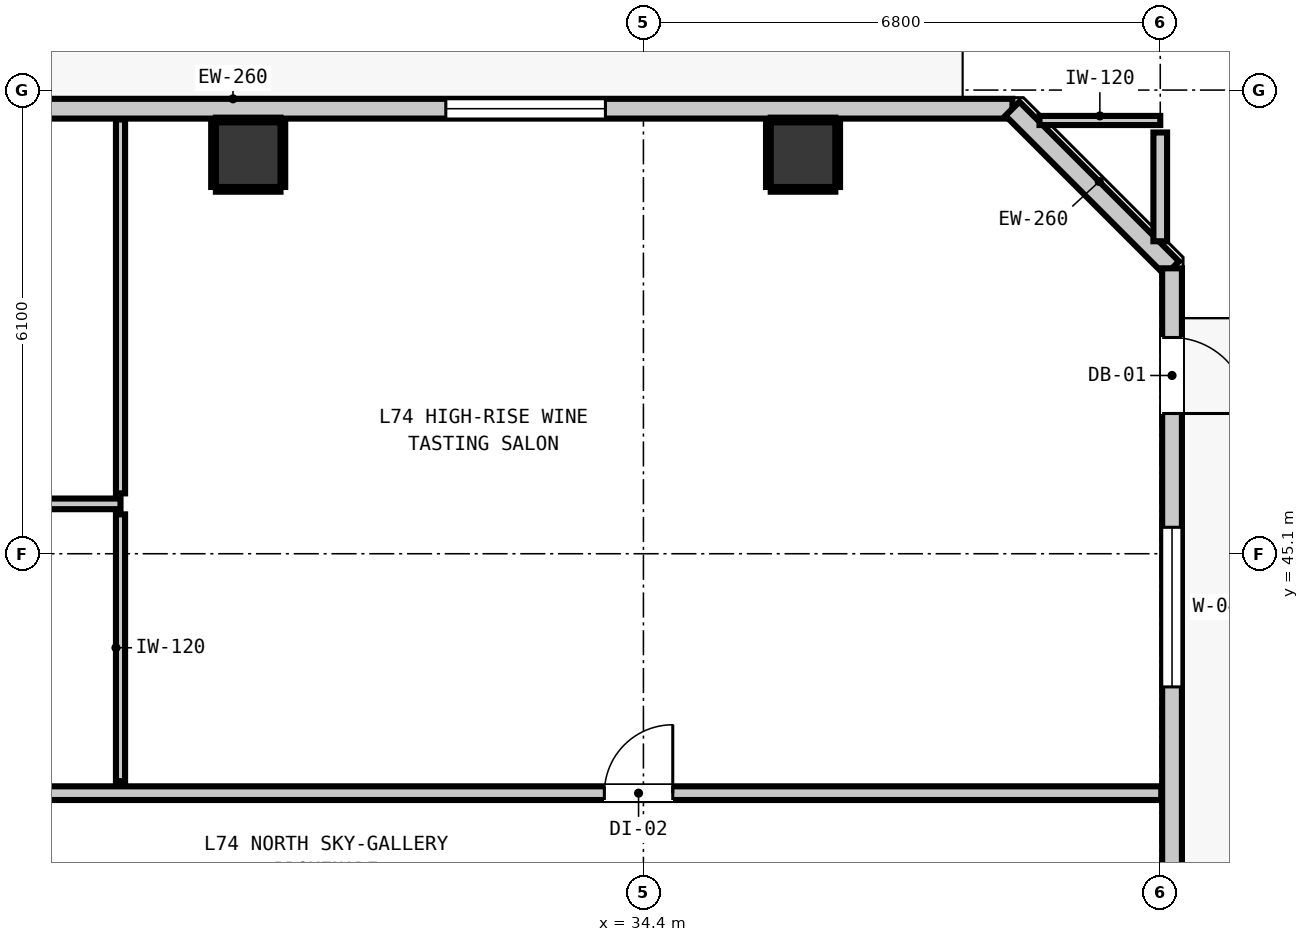
"""IFC4 building model, lengths in metres.
Left out: names, types, materials, properties, quantities, classifications, styles, units other than length and angle.
Written with IfcOpenShell. Run it as: python <this file> out.ifc"""

import sys

from ifc_helpers import new_model, si_unit, direction, frame, frame_2d, origin, origin_2d, place, context, subcontext, project, spatial, rectangle, extrude, element, fill, save


model = new_model("IFC4")
c1 = context("Model", 3, precision=1e-05, world=origin(), true_north=direction((0.0, 1.0)))
c2 = subcontext(c1, "Body", "Model", "MODEL_VIEW")
j1 = project(units=[si_unit("LENGTHUNIT", "METRE"), si_unit("PLANEANGLEUNIT", "RADIAN")], contexts=[c1])
p1 = place(None, origin())
s1 = spatial("IfcSite", under=j1, at=p1, CompositionType="ELEMENT")
p2 = place(p1, origin())
s2 = spatial("IfcBuilding", under=s1, at=p2, CompositionType="ELEMENT")
p3 = place(p2, frame((0.0, 0.0, 254.52)))
s3 = spatial("IfcBuildingStorey", under=s2, at=p3, CompositionType="ELEMENT", Elevation=254.52)
for number, where, z_axis, x_axis in (
    (1, (29.2, 50.35, 0.0), (0.0, 0.0, 1.0), (1.0, 0.0, 0.0)),
    (2, (36.5, 50.35, 0.0), (0.0, 0.0, 1.0), (1.0, 0.0, 0.0)),
):
    element("IfcColumn", number, at=place(p3, frame(where, z_axis=z_axis, x_axis=x_axis)), inside=s3, PredefinedType="COLUMN", context=c2, shape_type="SweptSolid", body=[
        extrude(rectangle(XDim=0.85, YDim=0.85, at=origin_2d()), origin(), (0.0, 0.0, 1.0), 3.32),
    ])
p4 = place(p3, frame((6.545, 50.955, 0.0), z_axis=(0.0, 0.0, 1.0), x_axis=(1.0, 0.0, 0.0)))
e3 = element("IfcWall", 3, at=p4, inside=s3, PredefinedType="STANDARD", context=c2, shape_type="SweptSolid", body=[
    extrude(rectangle(XDim=32.71, YDim=0.26, at=frame_2d((16.355, 0.0))), origin(), (0.0, 0.0, 1.0), 2.96),
])
p5 = place(p4, frame((0.907, 0.0, 0.0)))
e4 = element("IfcOpeningElement", 4, at=p5, cuts=e3, PredefinedType="OPENING", context=c2, shape_type="SweptSolid", body=[
    extrude(rectangle(XDim=1.0, YDim=2.15, at=frame_2d((0.5, 1.075))), frame((0.0, 0.14, 0.0), z_axis=(0.0, -1.0, 0.0), x_axis=(1.0, 0.0, 0.0)), (0.0, 0.0, 1.0), 0.28),
])
p6 = place(p4, frame((3.878, 0.0, 0.85)))
e5 = element("IfcOpeningElement", 5, at=p6, cuts=e3, PredefinedType="OPENING", context=c2, shape_type="SweptSolid", body=[
    extrude(rectangle(XDim=2.1, YDim=1.9, at=frame_2d((1.05, 0.95))), frame((0.0, 0.14, 0.0), z_axis=(0.0, -1.0, 0.0), x_axis=(1.0, 0.0, 0.0)), (0.0, 0.0, 1.0), 0.28),
])
p7 = place(p4, frame((2.377, 0.0, 0.85)))
e6 = element("IfcOpeningElement", 6, at=p7, cuts=e3, PredefinedType="OPENING", context=c2, shape_type="SweptSolid", body=[
    extrude(rectangle(XDim=0.58, YDim=1.5, at=frame_2d((0.29, 0.75))), frame((0.0, 0.14, 0.0), z_axis=(0.0, -1.0, 0.0), x_axis=(1.0, 0.0, 0.0)), (0.0, 0.0, 1.0), 0.28),
])
p8 = place(p4, frame((11.016, 0.0, 0.85)))
e7 = element("IfcOpeningElement", 7, at=p8, cuts=e3, PredefinedType="OPENING", context=c2, shape_type="SweptSolid", body=[
    extrude(rectangle(XDim=2.1, YDim=1.9, at=frame_2d((1.05, 0.95))), frame((0.0, 0.14, 0.0), z_axis=(0.0, -1.0, 0.0), x_axis=(1.0, 0.0, 0.0)), (0.0, 0.0, 1.0), 0.28),
])
p9 = place(p4, frame((17.555, 0.0, 0.85)))
e8 = element("IfcOpeningElement", 8, at=p9, cuts=e3, PredefinedType="OPENING", context=c2, shape_type="SweptSolid", body=[
    extrude(rectangle(XDim=2.1, YDim=1.9, at=frame_2d((1.05, 0.95))), frame((0.0, 0.14, 0.0), z_axis=(0.0, -1.0, 0.0), x_axis=(1.0, 0.0, 0.0)), (0.0, 0.0, 1.0), 0.28),
])
p10 = place(p4, frame((25.255, 0.0, 0.85)))
e9 = element("IfcOpeningElement", 9, at=p10, cuts=e3, PredefinedType="OPENING", context=c2, shape_type="SweptSolid", body=[
    extrude(rectangle(XDim=2.1, YDim=1.9, at=frame_2d((1.05, 0.95))), frame((0.0, 0.14, 0.0), z_axis=(0.0, -1.0, 0.0), x_axis=(1.0, 0.0, 0.0)), (0.0, 0.0, 1.0), 0.28),
])
p11 = place(p3, frame((39.255, 50.955, 0.0), z_axis=(0.0, 0.0, 1.0), x_axis=(0.707106781187, -0.707106781187, 0.0)))
e10 = element("IfcWall", 10, at=p11, inside=s3, PredefinedType="STANDARD", context=c2, shape_type="SweptSolid", body=[
    extrude(rectangle(XDim=2.97, YDim=0.26, at=frame_2d((1.485, 0.0))), origin(), (0.0, 0.0, 1.0), 2.96),
])
p12 = place(p3, frame((41.355, 48.855, 0.0), z_axis=(0.0, 0.0, 1.0), x_axis=(0.0, -1.0, 0.0)))
e11 = element("IfcWall", 11, at=p12, inside=s3, PredefinedType="STANDARD", context=c2, shape_type="SweptSolid", body=[
    extrude(rectangle(XDim=30.31, YDim=0.26, at=frame_2d((15.155, 0.0))), origin(), (0.0, 0.0, 1.0), 2.96),
])
p13 = place(p12, frame((0.91, 0.0, 0.0)))
e12 = element("IfcOpeningElement", 12, at=p13, cuts=e11, PredefinedType="OPENING", context=c2, shape_type="SweptSolid", body=[
    extrude(rectangle(XDim=1.0, YDim=2.15, at=frame_2d((0.5, 1.075))), frame((0.0, 0.14, 0.0), z_axis=(0.0, -1.0, 0.0), x_axis=(1.0, 0.0, 0.0)), (0.0, 0.0, 1.0), 0.28),
])
p14 = place(p12, frame((3.407, 0.0, 0.85)))
e13 = element("IfcOpeningElement", 13, at=p14, cuts=e11, PredefinedType="OPENING", context=c2, shape_type="SweptSolid", body=[
    extrude(rectangle(XDim=2.1, YDim=1.9, at=frame_2d((1.05, 0.95))), frame((0.0, 0.14, 0.0), z_axis=(0.0, -1.0, 0.0), x_axis=(1.0, 0.0, 0.0)), (0.0, 0.0, 1.0), 0.28),
])
p15 = place(p3, frame((4.587, 41.95, 0.0), z_axis=(0.0, 0.0, 1.0), x_axis=(1.0, 0.0, 0.0)))
e14 = element("IfcWall", 14, at=p15, inside=s3, PredefinedType="PARTITIONING", context=c2, shape_type="SweptSolid", body=[
    extrude(rectangle(XDim=36.626, YDim=0.18, at=frame_2d((18.313, 0.0))), origin(), (0.0, 0.0, 1.0), 2.96),
])
p16 = place(p15, frame((8.223, 0.0, 0.0)))
e15 = element("IfcOpeningElement", 15, at=p16, cuts=e14, PredefinedType="OPENING", context=c2, shape_type="SweptSolid", body=[
    extrude(rectangle(XDim=1.0, YDim=2.15, at=frame_2d((0.5, 1.075))), frame((0.0, 0.1, 0.0), z_axis=(0.0, -1.0, 0.0), x_axis=(1.0, 0.0, 0.0)), (0.0, 0.0, 1.0), 0.2),
])
p17 = place(p15, frame((29.299, 0.0, 0.0)))
e16 = element("IfcOpeningElement", 16, at=p17, cuts=e14, PredefinedType="OPENING", context=c2, shape_type="SweptSolid", body=[
    extrude(rectangle(XDim=0.9, YDim=2.1, at=frame_2d((0.45, 1.05))), frame((0.0, 0.1, 0.0), z_axis=(0.0, -1.0, 0.0), x_axis=(1.0, 0.0, 0.0)), (0.0, 0.0, 1.0), 0.2),
])
p18 = place(p3, frame((16.748, 45.756, 0.0), z_axis=(0.0, 0.0, 1.0), x_axis=(1.0, 0.0, 0.0)))
e17 = element("IfcWall", 17, at=p18, inside=s3, PredefinedType="PARTITIONING", context=c2, shape_type="SweptSolid", body=[
    extrude(rectangle(XDim=10.772, YDim=0.14, at=frame_2d((5.386, 0.0))), origin(), (0.0, 0.0, 1.0), 2.96),
])
p19 = place(p3, frame((39.611, 50.8, 0.0), z_axis=(0.0, 0.0, 1.0), x_axis=(1.0, 0.0, 0.0)))
e18 = element("IfcWall", 18, at=p19, inside=s3, PredefinedType="PARTITIONING", context=c2, shape_type="SweptSolid", body=[
    extrude(rectangle(XDim=1.589, YDim=0.12, at=frame_2d((0.794, 0.0))), origin(), (0.0, 0.0, 1.0), 2.96),
])
p20 = place(p3, frame((41.2, 49.211, 0.0), z_axis=(0.0, 0.0, 1.0), x_axis=(0.0, 1.0, 0.0)))
e19 = element("IfcWall", 19, at=p20, inside=s3, PredefinedType="PARTITIONING", context=c2, shape_type="SweptSolid", body=[
    extrude(rectangle(XDim=1.431, YDim=0.18, at=frame_2d((0.716, 0.0))), origin(), (0.0, 0.0, 1.0), 2.96),
])
p21 = place(p3, frame((27.52, 42.108, 0.0), z_axis=(0.0, 0.0, 1.0), x_axis=(0.0, 1.0, 0.0)))
e20 = element("IfcWall", 20, at=p21, inside=s3, PredefinedType="PARTITIONING", context=c2, shape_type="SweptSolid", body=[
    extrude(rectangle(XDim=3.51, YDim=0.12, at=frame_2d((1.755, 0.0))), origin(), (0.0, 0.0, 1.0), 2.96),
])
p22 = place(p3, frame((27.52, 45.894, 0.0), z_axis=(0.0, 0.0, 1.0), x_axis=(0.0, 1.0, 0.0)))
e21 = element("IfcWall", 21, at=p22, inside=s3, PredefinedType="PARTITIONING", context=c2, shape_type="SweptSolid", body=[
    extrude(rectangle(XDim=4.919, YDim=0.12, at=frame_2d((2.459, 0.0))), origin(), (0.0, 0.0, 1.0), 2.96),
])
for number, where, z_axis, x_axis in (
    (22, (28.775, 49.893, 0.0), (0.0, 0.0, 1.0), (1.0, 0.0, 0.0)),
    (23, (28.775, 50.807, 0.0), (0.0, 0.0, 1.0), (1.0, 0.0, 0.0)),
):
    element("IfcWall", number, at=place(p3, frame(where, z_axis=z_axis, x_axis=x_axis)), inside=s3, PredefinedType="PARTITIONING", context=c2, shape_type="SweptSolid", body=[
        extrude(rectangle(XDim=0.85, YDim=0.06, at=frame_2d((0.425, 0.0))), origin(), (0.0, 0.0, 1.0), 1.45),
    ])
for number, where, z_axis, x_axis in (
    (24, (28.743, 49.925, 0.0), (0.0, 0.0, 1.0), (0.0, 1.0, 0.0)),
    (25, (29.657, 49.925, 0.0), (0.0, 0.0, 1.0), (0.0, 1.0, 0.0)),
):
    element("IfcWall", number, at=place(p3, frame(where, z_axis=z_axis, x_axis=x_axis)), inside=s3, PredefinedType="PARTITIONING", context=c2, shape_type="SweptSolid", body=[
        extrude(rectangle(XDim=0.85, YDim=0.06, at=frame_2d((0.425, 0.0))), origin(), (0.0, 0.0, 1.0), 1.45),
    ])
for number, where, z_axis, x_axis in (
    (26, (36.075, 49.893, 0.0), (0.0, 0.0, 1.0), (1.0, 0.0, 0.0)),
    (27, (36.075, 50.807, 0.0), (0.0, 0.0, 1.0), (1.0, 0.0, 0.0)),
):
    element("IfcWall", number, at=place(p3, frame(where, z_axis=z_axis, x_axis=x_axis)), inside=s3, PredefinedType="PARTITIONING", context=c2, shape_type="SweptSolid", body=[
        extrude(rectangle(XDim=0.85, YDim=0.06, at=frame_2d((0.425, 0.0))), origin(), (0.0, 0.0, 1.0), 1.45),
    ])
for number, where, z_axis, x_axis in (
    (28, (36.043, 49.925, 0.0), (0.0, 0.0, 1.0), (0.0, 1.0, 0.0)),
    (29, (36.957, 49.925, 0.0), (0.0, 0.0, 1.0), (0.0, 1.0, 0.0)),
):
    element("IfcWall", number, at=place(p3, frame(where, z_axis=z_axis, x_axis=x_axis)), inside=s3, PredefinedType="PARTITIONING", context=c2, shape_type="SweptSolid", body=[
        extrude(rectangle(XDim=0.85, YDim=0.06, at=frame_2d((0.425, 0.0))), origin(), (0.0, 0.0, 1.0), 1.45),
    ])
p23 = place(p13, origin())
e30 = element("IfcDoor", 30, at=p23, inside=s3, OperationType="SINGLE_SWING_RIGHT", PredefinedType="DOOR", context=c2, shape_type="SweptSolid", body=[
    extrude(rectangle(XDim=1.0, YDim=2.15, at=frame_2d((0.5, 1.075))), frame((0.0, 0.025, 0.0), z_axis=(0.0, -1.0, 0.0), x_axis=(1.0, 0.0, 0.0)), (0.0, 0.0, 1.0), 0.05),
])
fill(e12, e30)
p24 = place(p10, origin())
e31 = element("IfcWindow", 31, at=p24, inside=s3, PartitioningType="SINGLE_PANEL", PredefinedType="WINDOW", context=c2, shape_type="SweptSolid", body=[
    extrude(rectangle(XDim=2.1, YDim=1.9, at=frame_2d((1.05, 0.95))), frame((0.0, 0.03, 0.0), z_axis=(0.0, -1.0, 0.0), x_axis=(1.0, 0.0, 0.0)), (0.0, 0.0, 1.0), 0.06),
])
fill(e9, e31)
p25 = place(p14, origin())
e32 = element("IfcWindow", 32, at=p25, inside=s3, PartitioningType="SINGLE_PANEL", PredefinedType="WINDOW", context=c2, shape_type="SweptSolid", body=[
    extrude(rectangle(XDim=2.1, YDim=1.9, at=frame_2d((1.05, 0.95))), frame((0.0, 0.03, 0.0), z_axis=(0.0, -1.0, 0.0), x_axis=(1.0, 0.0, 0.0)), (0.0, 0.0, 1.0), 0.06),
])
fill(e13, e32)
p26 = place(p17, origin())
e33 = element("IfcDoor", 33, at=p26, inside=s3, OperationType="SINGLE_SWING_RIGHT", PredefinedType="DOOR", context=c2, shape_type="SweptSolid", body=[
    extrude(rectangle(XDim=0.9, YDim=2.1, at=frame_2d((0.45, 1.05))), frame((0.0, 0.025, 0.0), z_axis=(0.0, -1.0, 0.0), x_axis=(1.0, 0.0, 0.0)), (0.0, 0.0, 1.0), 0.05),
])
fill(e16, e33)
save(model, sys.argv[1])
